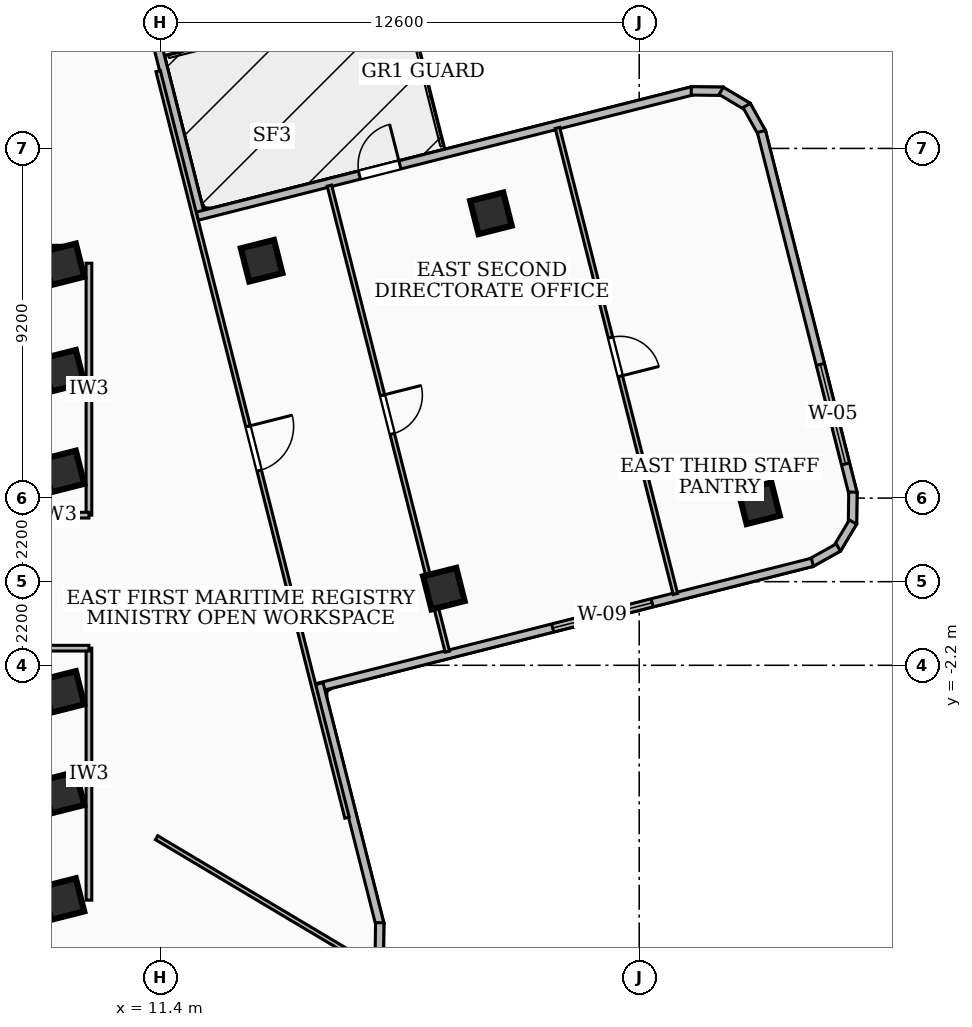
"""IFC4 building model, lengths in metres.
Left out: names, types, materials, properties, quantities, classifications, styles, units other than length and angle.
Written with IfcOpenShell. Run it as: python <this file> out.ifc"""

import sys

from ifc_helpers import new_model, si_unit, direction, frame, frame_2d, origin, origin_2d, place, context, subcontext, project, spatial, rectangle, extrude, element, fill, save


model = new_model("IFC4")
c1 = context("Model", 3, precision=1e-05, world=origin(), true_north=direction((0.0, 1.0)))
c2 = subcontext(c1, "Body", "Model", "MODEL_VIEW")
j1 = project(units=[si_unit("LENGTHUNIT", "METRE"), si_unit("PLANEANGLEUNIT", "RADIAN")], contexts=[c1])
p1 = place(None, origin())
s1 = spatial("IfcSite", under=j1, at=p1, CompositionType="ELEMENT")
p2 = place(p1, origin())
s2 = spatial("IfcBuilding", under=s1, at=p2, CompositionType="ELEMENT")
p3 = place(p2, frame((0.0, 0.0, 127.08)))
s3 = spatial("IfcBuildingStorey", under=s2, at=p3, CompositionType="ELEMENT", Elevation=127.08)
for number, where, z_axis, x_axis in (
    (1, (-8.78, 8.56, 0.0), (0.0, 0.0, 1.0), (1.0, 0.0, 0.0)),
    (2, (8.78, -8.56, 0.0), (0.0, 0.0, 1.0), (-1.0, 0.0, 0.0)),
):
    element("IfcWall", number, at=place(p3, frame(where, z_axis=z_axis, x_axis=x_axis)), inside=s3, PredefinedType="SHEAR", context=c2, shape_type="SweptSolid", body=[
        extrude(rectangle(XDim=17.56, YDim=0.5, at=frame_2d((8.78, 0.0))), origin(), (0.0, 0.0, 1.0), 3.34),
    ])
for number, where, z_axis, x_axis in (
    (3, (8.85, -5.55, 0.0), (0.0, 0.0, 1.0), (0.969, 0.245, 0.0)),
    (4, (8.85, -2.9, 0.0), (0.0, 0.0, 1.0), (0.969, 0.245, 0.0)),
    (5, (8.85, 2.9, 0.0), (0.0, 0.0, 1.0), (0.969, 0.245, 0.0)),
    (6, (8.85, 5.55, 0.0), (0.0, 0.0, 1.0), (0.969, 0.245, 0.0)),
    (7, (8.85, -8.35, 0.0), (0.0, 0.0, 1.0), (0.969, 0.245, 0.0)),
    (8, (8.85, 8.35, 0.0), (0.0, 0.0, 1.0), (0.969, 0.245, 0.0)),
    (9, (18.86, -0.183, 0.0), (0.0, 0.0, 1.0), (0.969, 0.245, 0.0)),
    (10, (14.064, 8.445, 0.0), (0.0, 0.0, 1.0), (0.969, 0.245, 0.0)),
    (11, (27.153, 2.064, 0.0), (0.0, 0.0, 1.0), (0.969, 0.245, 0.0)),
    (12, (20.098, 9.692, 0.0), (0.0, 0.0, 1.0), (0.969, 0.245, 0.0)),
):
    element("IfcColumn", number, at=place(p3, frame(where, z_axis=z_axis, x_axis=x_axis)), inside=s3, PredefinedType="COLUMN", context=c2, shape_type="SweptSolid", body=[
        extrude(rectangle(XDim=0.9, YDim=0.9, at=origin_2d()), origin(), (0.0, 0.0, 1.0), 3.6),
    ])
p4 = place(p3, frame((10.82, 16.107, 0.0), z_axis=(0.0, 0.0, 1.0), x_axis=(0.245314006561, -0.969443674581, 0.0)))
e13 = element("IfcWall", 13, at=p4, inside=s3, PredefinedType="SOLIDWALL", context=c2, shape_type="SweptSolid", body=[
    extrude(rectangle(XDim=6.759, YDim=0.22, at=frame_2d((3.379, 0.0))), origin(), (0.0, 0.0, 1.0), 2.644),
])
p5 = place(p3, frame((12.371, 9.618, 0.0), z_axis=(0.0, 0.0, 1.0), x_axis=(0.969434127448, 0.245351732293, 0.0)))
e14 = element("IfcWall", 14, at=p5, inside=s3, PredefinedType="SOLIDWALL", context=c2, shape_type="SweptSolid", body=[
    extrude(rectangle(XDim=13.458, YDim=0.22, at=frame_2d((6.729, 0.0))), origin(), (0.0, 0.0, 1.0), 2.644),
])
p6 = place(p5, frame((4.4, 0.0, 0.0)))
e15 = element("IfcOpeningElement", 15, at=p6, cuts=e14, PredefinedType="OPENING", context=c2, shape_type="SweptSolid", body=[
    extrude(rectangle(XDim=1.1, YDim=2.1, at=frame_2d((0.55, 1.05))), frame((0.0, 0.12, 0.0), z_axis=(0.0, -1.0, 0.0), x_axis=(1.0, 0.0, 0.0)), (0.0, 0.0, 1.0), 0.24),
])
p7 = place(p3, frame((25.369, 12.914, 0.0), z_axis=(0.0, 0.0, 1.0), x_axis=(0.999913243347, -0.013172159236, 0.0)))
e16 = element("IfcWall", 16, at=p7, inside=s3, PredefinedType="SOLIDWALL", context=c2, shape_type="SweptSolid", body=[
    extrude(rectangle(XDim=0.834, YDim=0.22, at=frame_2d((0.417, 0.0))), origin(), (0.0, 0.0, 1.0), 3.34),
])
p8 = place(p3, frame((26.157, 12.916, 0.0), z_axis=(0.0, 0.0, 1.0), x_axis=(0.858543269067, -0.512741119026, 0.0)))
e17 = element("IfcWall", 17, at=p8, inside=s3, PredefinedType="SOLIDWALL", context=c2, shape_type="SweptSolid", body=[
    extrude(rectangle(XDim=0.819, YDim=0.22, at=frame_2d((0.41, 0.0))), origin(), (0.0, 0.0, 1.0), 3.34),
])
p9 = place(p3, frame((26.827, 12.531, 0.0), z_axis=(0.0, 0.0, 1.0), x_axis=(0.486561807946, -0.873646156661, 0.0)))
e18 = element("IfcWall", 18, at=p9, inside=s3, PredefinedType="SOLIDWALL", context=c2, shape_type="SweptSolid", body=[
    extrude(rectangle(XDim=0.834, YDim=0.22, at=frame_2d((0.417, 0.0))), origin(), (0.0, 0.0, 1.0), 3.34),
])
p10 = place(p3, frame((27.215, 11.848, 0.0), z_axis=(0.0, 0.0, 1.0), x_axis=(0.245295842673, -0.969448270702, 0.0)))
e19 = element("IfcWall", 19, at=p10, inside=s3, PredefinedType="SOLIDWALL", context=c2, shape_type="SweptSolid", body=[
    extrude(rectangle(XDim=9.84, YDim=0.22, at=frame_2d((4.92, 0.0))), origin(), (0.0, 0.0, 1.0), 3.34),
])
p11 = place(p10, frame((6.326, 0.0, 0.85)))
e20 = element("IfcOpeningElement", 20, at=p11, cuts=e19, PredefinedType="OPENING", context=c2, shape_type="SweptSolid", body=[
    extrude(rectangle(XDim=2.7, YDim=1.85, at=frame_2d((1.35, 0.925))), frame((0.0, 0.12, 0.0), z_axis=(0.0, -1.0, 0.0), x_axis=(1.0, 0.0, 0.0)), (0.0, 0.0, 1.0), 0.24),
])
p12 = place(p3, frame((29.623, 2.357, 0.0), z_axis=(0.0, 0.0, 1.0), x_axis=(-0.013172159236, -0.999913243347, 0.0)))
e21 = element("IfcWall", 21, at=p12, inside=s3, PredefinedType="SOLIDWALL", context=c2, shape_type="SweptSolid", body=[
    extrude(rectangle(XDim=0.834, YDim=0.22, at=frame_2d((0.417, 0.0))), origin(), (0.0, 0.0, 1.0), 3.34),
])
p13 = place(p3, frame((29.625, 1.569, 0.0), z_axis=(0.0, 0.0, 1.0), x_axis=(-0.513266477087, -0.858229295409, 0.0)))
e22 = element("IfcWall", 22, at=p13, inside=s3, PredefinedType="SOLIDWALL", context=c2, shape_type="SweptSolid", body=[
    extrude(rectangle(XDim=0.818, YDim=0.22, at=frame_2d((0.409, 0.0))), origin(), (0.0, 0.0, 1.0), 3.34),
])
p14 = place(p3, frame((29.24, 0.9, 0.0), z_axis=(0.0, 0.0, 1.0), x_axis=(-0.873148499647, -0.487454303052, 0.0)))
e23 = element("IfcWall", 23, at=p14, inside=s3, PredefinedType="SOLIDWALL", context=c2, shape_type="SweptSolid", body=[
    extrude(rectangle(XDim=0.835, YDim=0.22, at=frame_2d((0.417, 0.0))), origin(), (0.0, 0.0, 1.0), 3.34),
])
p15 = place(p3, frame((28.557, 0.511, 0.0), z_axis=(0.0, 0.0, 1.0), x_axis=(-0.969429758912, -0.245368992613, 0.0)))
e24 = element("IfcWall", 24, at=p15, inside=s3, PredefinedType="SOLIDWALL", context=c2, shape_type="SweptSolid", body=[
    extrude(rectangle(XDim=13.457, YDim=0.22, at=frame_2d((6.729, 0.0))), origin(), (0.0, 0.0, 1.0), 3.34),
])
p16 = place(p15, frame((4.35, 0.0, 0.85)))
e25 = element("IfcOpeningElement", 25, at=p16, cuts=e24, PredefinedType="OPENING", context=c2, shape_type="SweptSolid", body=[
    extrude(rectangle(XDim=2.7, YDim=1.65, at=frame_2d((1.35, 0.825))), frame((0.0, 0.12, 0.0), z_axis=(0.0, -1.0, 0.0), x_axis=(1.0, 0.0, 0.0)), (0.0, 0.0, 1.0), 0.24),
])
p17 = place(p3, frame((15.574, -2.684, 0.0), z_axis=(0.0, 0.0, 1.0), x_axis=(0.245346347134, -0.969435490349, 0.0)))
e26 = element("IfcWall", 26, at=p17, inside=s3, PredefinedType="SOLIDWALL", context=c2, shape_type="SweptSolid", body=[
    extrude(rectangle(XDim=6.538, YDim=0.22, at=frame_2d((3.269, 0.0))), origin(), (0.0, 0.0, 1.0), 3.34),
])
p18 = place(p3, frame((17.172, -8.973, 0.0), z_axis=(0.0, 0.0, 1.0), x_axis=(-0.013464821393, -0.999909345183, 0.0)))
e27 = element("IfcWall", 27, at=p18, inside=s3, PredefinedType="SOLIDWALL", context=c2, shape_type="SweptSolid", body=[
    extrude(rectangle(XDim=0.834, YDim=0.22, at=frame_2d((0.417, 0.0))), origin(), (0.0, 0.0, 1.0), 3.34),
])
p19 = place(p3, frame((9.52, 1.75, 0.0), z_axis=(0.0, 0.0, 1.0), x_axis=(0.0, 1.0, 0.0)))
e28 = element("IfcWall", 28, at=p19, inside=s3, PredefinedType="PARTITIONING", context=c2, shape_type="SweptSolid", body=[
    extrude(rectangle(XDim=6.63, YDim=0.15, at=frame_2d((3.315, 0.0))), origin(), (0.0, 0.0, 1.0), 2.57),
])
p20 = place(p3, frame((7.85, 1.75, 0.0), z_axis=(0.0, 0.0, 1.0), x_axis=(1.0, 0.0, 0.0)))
e29 = element("IfcWall", 29, at=p20, inside=s3, PredefinedType="PARTITIONING", context=c2, shape_type="SweptSolid", body=[
    extrude(rectangle(XDim=1.67, YDim=0.15, at=frame_2d((0.835, 0.0))), origin(), (0.0, 0.0, 1.0), 2.57),
])
p21 = place(p3, frame((9.52, -8.38, 0.0), z_axis=(0.0, 0.0, 1.0), x_axis=(0.0, 1.0, 0.0)))
e30 = element("IfcWall", 30, at=p21, inside=s3, PredefinedType="PARTITIONING", context=c2, shape_type="SweptSolid", body=[
    extrude(rectangle(XDim=6.63, YDim=0.15, at=frame_2d((3.315, 0.0))), origin(), (0.0, 0.0, 1.0), 2.57),
])
p22 = place(p3, frame((7.85, -1.75, 0.0), z_axis=(0.0, 0.0, 1.0), x_axis=(1.0, 0.0, 0.0)))
e31 = element("IfcWall", 31, at=p22, inside=s3, PredefinedType="PARTITIONING", context=c2, shape_type="SweptSolid", body=[
    extrude(rectangle(XDim=1.67, YDim=0.15, at=frame_2d((0.835, 0.0))), origin(), (0.0, 0.0, 1.0), 2.57),
])
p23 = place(p3, frame((6.188, 10.38, 0.0), z_axis=(0.0, 0.0, 1.0), x_axis=(0.511972353143, 0.859001926434, 0.0)))
e32 = element("IfcWall", 32, at=p23, inside=s3, PredefinedType="PARTITIONING", context=c2, shape_type="SweptSolid", body=[
    extrude(rectangle(XDim=7.59, YDim=0.12, at=frame_2d((3.795, 0.0))), origin(), (0.0, 0.0, 1.0), 2.57),
])
p24 = place(p3, frame((11.3, -6.736, 0.0), z_axis=(0.0, 0.0, 1.0), x_axis=(0.858979599017, -0.512009812868, 0.0)))
e33 = element("IfcWall", 33, at=p24, inside=s3, PredefinedType="PARTITIONING", context=c2, shape_type="SweptSolid", body=[
    extrude(rectangle(XDim=6.519, YDim=0.12, at=frame_2d((3.26, 0.0))), origin(), (0.0, 0.0, 1.0), 3.34),
])
p25 = place(p3, frame((11.342, 13.433, 0.0), z_axis=(0.0, 0.0, 1.0), x_axis=(0.24525085526, -0.969459652587, 0.0)))
e34 = element("IfcWall", 34, at=p25, inside=s3, PredefinedType="PARTITIONING", context=c2, shape_type="SweptSolid", body=[
    extrude(rectangle(XDim=20.261, YDim=0.12, at=frame_2d((10.13, 0.0))), origin(), (0.0, 0.0, 1.0), 2.57),
])
p26 = place(p25, frame((9.64, 0.0, 0.0)))
e35 = element("IfcOpeningElement", 35, at=p26, cuts=e34, PredefinedType="OPENING", context=c2, shape_type="SweptSolid", body=[
    extrude(rectangle(XDim=1.2, YDim=2.1, at=frame_2d((0.6, 1.05))), frame((0.0, 0.07, 0.0), z_axis=(0.0, -1.0, 0.0), x_axis=(1.0, 0.0, 0.0)), (0.0, 0.0, 1.0), 0.14),
])
p27 = place(p3, frame((15.848, 10.421, 0.0), z_axis=(0.0, 0.0, 1.0), x_axis=(0.24530936383, -0.969444849394, 0.0)))
e36 = element("IfcWall", 36, at=p27, inside=s3, PredefinedType="PARTITIONING", context=c2, shape_type="SweptSolid", body=[
    extrude(rectangle(XDim=12.649, YDim=0.12, at=frame_2d((6.325, 0.0))), origin(), (0.0, 0.0, 1.0), 2.57),
])
p28 = place(p27, frame((5.69, 0.0, 0.0)))
e37 = element("IfcOpeningElement", 37, at=p28, cuts=e36, PredefinedType="OPENING", context=c2, shape_type="SweptSolid", body=[
    extrude(rectangle(XDim=1.05, YDim=2.08, at=frame_2d((0.525, 1.04))), frame((0.0, 0.07, 0.0), z_axis=(0.0, -1.0, 0.0), x_axis=(1.0, 0.0, 0.0)), (0.0, 0.0, 1.0), 0.14),
])
p29 = place(p3, frame((21.849, 11.94, 0.0), z_axis=(0.0, 0.0, 1.0), x_axis=(0.245272867445, -0.969454083748, 0.0)))
e38 = element("IfcWall", 38, at=p29, inside=s3, PredefinedType="PARTITIONING", context=c2, shape_type="SweptSolid", body=[
    extrude(rectangle(XDim=12.65, YDim=0.12, at=frame_2d((6.325, 0.0))), origin(), (0.0, 0.0, 1.0), 2.57),
])
p30 = place(p29, frame((5.69, 0.0, 0.0)))
e39 = element("IfcOpeningElement", 39, at=p30, cuts=e38, PredefinedType="OPENING", context=c2, shape_type="SweptSolid", body=[
    extrude(rectangle(XDim=1.05, YDim=2.08, at=frame_2d((0.525, 1.04))), frame((0.0, 0.07, 0.0), z_axis=(0.0, -1.0, 0.0), x_axis=(1.0, 0.0, 0.0)), (0.0, 0.0, 1.0), 0.14),
])
p31 = place(p6, origin())
e40 = element("IfcDoor", 40, at=p31, inside=s3, OperationType="SINGLE_SWING_RIGHT", PredefinedType="DOOR", context=c2, shape_type="SweptSolid", body=[
    extrude(rectangle(XDim=1.1, YDim=2.1, at=frame_2d((0.55, 1.05))), frame((0.0, 0.025, 0.0), z_axis=(0.0, -1.0, 0.0), x_axis=(1.0, 0.0, 0.0)), (0.0, 0.0, 1.0), 0.05),
])
fill(e15, e40)
p32 = place(p11, origin())
e41 = element("IfcWindow", 41, at=p32, inside=s3, PartitioningType="SINGLE_PANEL", PredefinedType="WINDOW", context=c2, shape_type="SweptSolid", body=[
    extrude(rectangle(XDim=2.7, YDim=1.85, at=frame_2d((1.35, 0.925))), frame((0.0, 0.03, 0.0), z_axis=(0.0, -1.0, 0.0), x_axis=(1.0, 0.0, 0.0)), (0.0, 0.0, 1.0), 0.06),
])
fill(e20, e41)
p33 = place(p16, origin())
e42 = element("IfcWindow", 42, at=p33, inside=s3, PartitioningType="SINGLE_PANEL", PredefinedType="WINDOW", context=c2, shape_type="SweptSolid", body=[
    extrude(rectangle(XDim=2.7, YDim=1.65, at=frame_2d((1.35, 0.825))), frame((0.0, 0.03, 0.0), z_axis=(0.0, -1.0, 0.0), x_axis=(1.0, 0.0, 0.0)), (0.0, 0.0, 1.0), 0.06),
])
fill(e25, e42)
p34 = place(p26, origin())
e43 = element("IfcDoor", 43, at=p34, inside=s3, OperationType="SINGLE_SWING_LEFT", PredefinedType="DOOR", context=c2, shape_type="SweptSolid", body=[
    extrude(rectangle(XDim=1.2, YDim=2.1, at=frame_2d((0.6, 1.05))), frame((0.0, 0.025, 0.0), z_axis=(0.0, -1.0, 0.0), x_axis=(1.0, 0.0, 0.0)), (0.0, 0.0, 1.0), 0.05),
])
fill(e35, e43)
p35 = place(p28, origin())
e44 = element("IfcDoor", 44, at=p35, inside=s3, OperationType="SINGLE_SWING_LEFT", PredefinedType="DOOR", context=c2, shape_type="SweptSolid", body=[
    extrude(rectangle(XDim=1.05, YDim=2.08, at=frame_2d((0.525, 1.04))), frame((0.0, 0.025, 0.0), z_axis=(0.0, -1.0, 0.0), x_axis=(1.0, 0.0, 0.0)), (0.0, 0.0, 1.0), 0.05),
])
fill(e37, e44)
p36 = place(p30, origin())
e45 = element("IfcDoor", 45, at=p36, inside=s3, OperationType="SINGLE_SWING_RIGHT", PredefinedType="DOOR", context=c2, shape_type="SweptSolid", body=[
    extrude(rectangle(XDim=1.05, YDim=2.08, at=frame_2d((0.525, 1.04))), frame((0.0, 0.025, 0.0), z_axis=(0.0, -1.0, 0.0), x_axis=(1.0, 0.0, 0.0)), (0.0, 0.0, 1.0), 0.05),
])
fill(e39, e45)
save(model, sys.argv[1])
